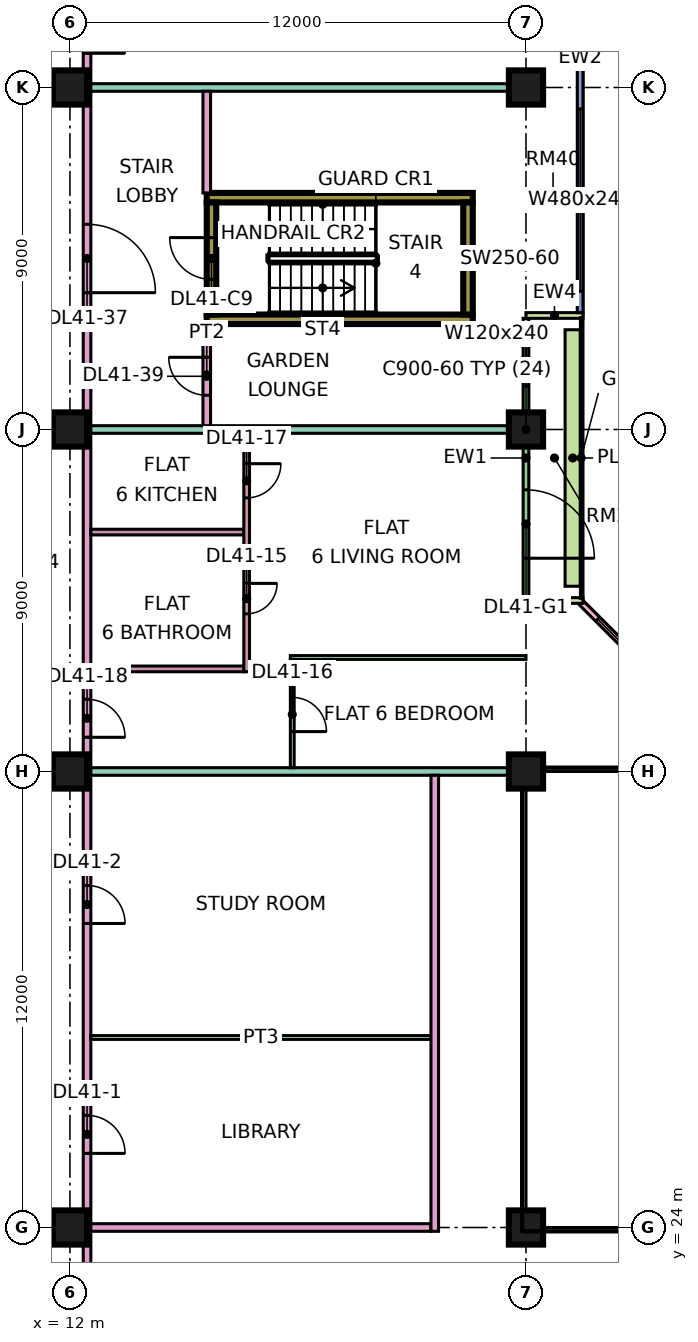
"""IFC4 building model, lengths in metres.
Left out: names, types, materials, properties, quantities, classifications, styles, units other than length and angle.
Written with IfcOpenShell. Run it as: python <this file> out.ifc"""

import sys

from ifc_helpers import new_model, si_unit, direction, frame, frame_2d, origin, origin_2d, place, context, subcontext, project, spatial, rectangle, extrude, element, fill, save


model = new_model("IFC4")
c1 = context("Model", 3, precision=1e-05, world=origin(), true_north=direction((0.0, 1.0)))
c2 = subcontext(c1, "Body", "Model", "MODEL_VIEW")
j1 = project(units=[si_unit("LENGTHUNIT", "METRE"), si_unit("PLANEANGLEUNIT", "RADIAN")], contexts=[c1])
p1 = place(None, origin())
s1 = spatial("IfcSite", under=j1, at=p1, CompositionType="ELEMENT")
p2 = place(p1, origin())
s2 = spatial("IfcBuilding", under=s1, at=p2, CompositionType="ELEMENT")
p3 = place(p2, frame((0.0, 0.0, 179.9)))
s3 = spatial("IfcBuildingStorey", under=s2, at=p3, CompositionType="ELEMENT", Elevation=179.9)
for number, where, z_axis, x_axis in (
    (1, (12.0, 24.0, 0.0), (0.0, 0.0, 1.0), (1.0, 0.0, 0.0)),
    (2, (12.0, 36.0, 0.0), (0.0, 0.0, 1.0), (1.0, 0.0, 0.0)),
    (3, (12.0, 45.0, 0.0), (0.0, 0.0, 1.0), (1.0, 0.0, 0.0)),
    (4, (12.0, 54.0, 0.0), (0.0, 0.0, 1.0), (1.0, 0.0, 0.0)),
    (5, (24.0, 24.0, 0.0), (0.0, 0.0, 1.0), (1.0, 0.0, 0.0)),
    (6, (24.0, 36.0, 0.0), (0.0, 0.0, 1.0), (1.0, 0.0, 0.0)),
    (7, (24.0, 45.0, 0.0), (0.0, 0.0, 1.0), (1.0, 0.0, 0.0)),
    (8, (24.0, 54.0, 0.0), (0.0, 0.0, 1.0), (1.0, 0.0, 0.0)),
):
    element("IfcColumn", number, at=place(p3, frame(where, z_axis=z_axis, x_axis=x_axis)), inside=s3, PredefinedType="COLUMN", context=c2, shape_type="SweptSolid", body=[
        extrude(rectangle(XDim=0.9, YDim=0.9, at=origin_2d()), origin(), (0.0, 0.0, 1.0), 3.75),
    ])
for number, where, z_axis, x_axis in (
    (9, (15.6, 47.9, 0.0), (0.0, 0.0, 1.0), (1.0, 0.0, 0.0)),
    (10, (15.6, 51.1, 0.0), (0.0, 0.0, 1.0), (1.0, 0.0, 0.0)),
):
    element("IfcWall", number, at=place(p3, frame(where, z_axis=z_axis, x_axis=x_axis)), inside=s3, PredefinedType="SHEAR", context=c2, shape_type="SweptSolid", body=[
        extrude(rectangle(XDim=7.0, YDim=0.25, at=frame_2d((3.5, 0.0))), origin(), (0.0, 0.0, 1.0), 3.75),
    ])
p4 = place(p3, frame((15.725, 48.025, 0.0), z_axis=(0.0, 0.0, 1.0), x_axis=(0.0, 1.0, 0.0)))
e11 = element("IfcWall", 11, at=p4, inside=s3, PredefinedType="SHEAR", context=c2, shape_type="SweptSolid", body=[
    extrude(rectangle(XDim=2.95, YDim=0.25, at=frame_2d((1.475, 0.0))), origin(), (0.0, 0.0, 1.0), 3.75),
])
p5 = place(p4, frame((0.925, 0.0, 0.0)))
e12 = element("IfcOpeningElement", 12, at=p5, cuts=e11, PredefinedType="OPENING", context=c2, shape_type="SweptSolid", body=[
    extrude(rectangle(XDim=1.1, YDim=2.2, at=frame_2d((0.55, 1.1))), frame((0.0, 0.135, 0.0), z_axis=(0.0, -1.0, 0.0), x_axis=(1.0, 0.0, 0.0)), (0.0, 0.0, 1.0), 0.27),
])
p6 = place(p3, frame((22.475, 48.025, 0.0), z_axis=(0.0, 0.0, 1.0), x_axis=(0.0, 1.0, 0.0)))
e13 = element("IfcWall", 13, at=p6, inside=s3, PredefinedType="SHEAR", context=c2, shape_type="SweptSolid", body=[
    extrude(rectangle(XDim=2.95, YDim=0.25, at=frame_2d((1.475, 0.0))), origin(), (0.0, 0.0, 1.0), 3.75),
])
p7 = place(p3, frame((28.447, 37.447, 0.0), z_axis=(0.0, 0.0, 1.0), x_axis=(-0.707106781187, 0.707106781187, 0.0)))
e14 = element("IfcWall", 14, at=p7, inside=s3, PredefinedType="SOLIDWALL", context=c2, shape_type="SweptSolid", body=[
    extrude(rectangle(XDim=4.243, YDim=0.15, at=frame_2d((2.121, 0.0))), origin(), (0.0, 0.0, 1.0), 3.35),
])
p8 = place(p7, frame((0.621, 0.0, 0.45)))
e15 = element("IfcOpeningElement", 15, at=p8, cuts=e14, PredefinedType="OPENING", context=c2, shape_type="SweptSolid", body=[
    extrude(rectangle(XDim=3.0, YDim=2.4, at=frame_2d((1.5, 1.2))), frame((0.0, 0.085, 0.0), z_axis=(0.0, -1.0, 0.0), x_axis=(1.0, 0.0, 0.0)), (0.0, 0.0, 1.0), 0.17),
])
p9 = place(p3, frame((24.0, 40.575, 0.0), z_axis=(0.0, 0.0, 1.0), x_axis=(0.0, 1.0, 0.0)))
e16 = element("IfcWall", 16, at=p9, inside=s3, PredefinedType="SOLIDWALL", context=c2, shape_type="SweptSolid", body=[
    extrude(rectangle(XDim=7.35, YDim=0.15, at=frame_2d((3.675, 0.0))), origin(), (0.0, 0.0, 1.0), 3.35),
])
p10 = place(p9, frame((1.038, 0.0, 0.0)))
e17 = element("IfcOpeningElement", 17, at=p10, cuts=e16, PredefinedType="OPENING", context=c2, shape_type="SweptSolid", body=[
    extrude(rectangle(XDim=1.8, YDim=2.4, at=frame_2d((0.9, 1.2))), frame((0.0, 0.085, 0.0), z_axis=(0.0, -1.0, 0.0), x_axis=(1.0, 0.0, 0.0)), (0.0, 0.0, 1.0), 0.17),
])
p11 = place(p9, frame((5.562, 0.0, 0.45)))
e18 = element("IfcOpeningElement", 18, at=p11, cuts=e16, PredefinedType="OPENING", context=c2, shape_type="SweptSolid", body=[
    extrude(rectangle(XDim=1.2, YDim=2.4, at=frame_2d((0.6, 1.2))), frame((0.0, 0.085, 0.0), z_axis=(0.0, -1.0, 0.0), x_axis=(1.0, 0.0, 0.0)), (0.0, 0.0, 1.0), 0.17),
])
for number, where, z_axis, x_axis in (
    (19, (25.5, 40.5, 0.0), (0.0, 0.0, 1.0), (-1.0, 0.0, 0.0)),
    (20, (25.5, 48.0, 0.0), (0.0, 0.0, 1.0), (-1.0, 0.0, 0.0)),
):
    element("IfcWall", number, at=place(p3, frame(where, z_axis=z_axis, x_axis=x_axis)), inside=s3, PredefinedType="SOLIDWALL", context=c2, shape_type="SweptSolid", body=[
        extrude(rectangle(XDim=1.5, YDim=0.15, at=frame_2d((0.75, 0.0))), origin(), (0.0, 0.0, 1.0), 3.35),
    ])
p12 = place(p3, frame((25.425, 48.075, 0.0), z_axis=(0.0, 0.0, 1.0), x_axis=(0.0, 1.0, 0.0)))
e21 = element("IfcWall", 21, at=p12, inside=s3, PredefinedType="SOLIDWALL", context=c2, shape_type="SweptSolid", body=[
    extrude(rectangle(XDim=13.425, YDim=0.15, at=frame_2d((6.712, 0.0))), origin(), (0.0, 0.0, 1.0), 3.35),
])
p13 = place(p12, frame((0.562, 0.0, 0.45)))
e22 = element("IfcOpeningElement", 22, at=p13, cuts=e21, PredefinedType="OPENING", context=c2, shape_type="SweptSolid", body=[
    extrude(rectangle(XDim=4.8, YDim=2.4, at=frame_2d((2.4, 1.2))), frame((0.0, 0.085, 0.0), z_axis=(0.0, -1.0, 0.0), x_axis=(1.0, 0.0, 0.0)), (0.0, 0.0, 1.0), 0.17),
])
p14 = place(p12, frame((7.425, 0.0, 0.45)))
e23 = element("IfcOpeningElement", 23, at=p14, cuts=e21, PredefinedType="OPENING", context=c2, shape_type="SweptSolid", body=[
    extrude(rectangle(XDim=3.0, YDim=2.4, at=frame_2d((1.5, 1.2))), frame((0.0, 0.085, 0.0), z_axis=(0.0, -1.0, 0.0), x_axis=(1.0, 0.0, 0.0)), (0.0, 0.0, 1.0), 0.17),
])
p15 = place(p12, frame((12.225, 0.0, 0.45)))
e24 = element("IfcOpeningElement", 24, at=p15, cuts=e21, PredefinedType="OPENING", context=c2, shape_type="SweptSolid", body=[
    extrude(rectangle(XDim=0.9, YDim=2.4, at=frame_2d((0.45, 1.2))), frame((0.0, 0.085, 0.0), z_axis=(0.0, -1.0, 0.0), x_axis=(1.0, 0.0, 0.0)), (0.0, 0.0, 1.0), 0.17),
])
p16 = place(p3, frame((25.229, 40.875, 0.0), z_axis=(0.0, 0.0, 1.0), x_axis=(0.0, 1.0, 0.0)))
e25 = element("IfcWall", 25, at=p16, inside=s3, PredefinedType="SOLIDWALL", context=c2, shape_type="SweptSolid", body=[
    extrude(rectangle(XDim=6.75, YDim=0.4, at=frame_2d((3.375, 0.0))), origin(), (0.0, 0.0, 1.0), 0.7),
])
p17 = place(p3, frame((12.45, 20.0, 0.0), z_axis=(0.0, 0.0, 1.0), x_axis=(0.0, 1.0, 0.0)))
e26 = element("IfcWall", 26, at=p17, inside=s3, PredefinedType="PARTITIONING", context=c2, shape_type="SweptSolid", body=[
    extrude(rectangle(XDim=42.926, YDim=0.2, at=frame_2d((21.463, 0.0))), origin(), (0.0, 0.0, 1.0), 3.35),
])
p18 = place(p17, frame((5.95, 0.0, 0.0)))
e27 = element("IfcOpeningElement", 27, at=p18, cuts=e26, PredefinedType="OPENING", context=c2, shape_type="SweptSolid", body=[
    extrude(rectangle(XDim=1.0, YDim=2.1, at=frame_2d((0.5, 1.05))), frame((0.0, 0.11, 0.0), z_axis=(0.0, -1.0, 0.0), x_axis=(1.0, 0.0, 0.0)), (0.0, 0.0, 1.0), 0.22),
])
p19 = place(p17, frame((12.0, 0.0, 0.0)))
e28 = element("IfcOpeningElement", 28, at=p19, cuts=e26, PredefinedType="OPENING", context=c2, shape_type="SweptSolid", body=[
    extrude(rectangle(XDim=1.0, YDim=2.1, at=frame_2d((0.5, 1.05))), frame((0.0, 0.11, 0.0), z_axis=(0.0, -1.0, 0.0), x_axis=(1.0, 0.0, 0.0)), (0.0, 0.0, 1.0), 0.22),
])
p20 = place(p17, frame((16.9, 0.0, 0.0)))
e29 = element("IfcOpeningElement", 29, at=p20, cuts=e26, PredefinedType="OPENING", context=c2, shape_type="SweptSolid", body=[
    extrude(rectangle(XDim=1.0, YDim=2.1, at=frame_2d((0.5, 1.05))), frame((0.0, 0.11, 0.0), z_axis=(0.0, -1.0, 0.0), x_axis=(1.0, 0.0, 0.0)), (0.0, 0.0, 1.0), 0.22),
])
p21 = place(p17, frame((34.9, 0.0, 0.0)))
e30 = element("IfcOpeningElement", 30, at=p21, cuts=e26, PredefinedType="OPENING", context=c2, shape_type="SweptSolid", body=[
    extrude(rectangle(XDim=1.0, YDim=2.1, at=frame_2d((0.5, 1.05))), frame((0.0, 0.11, 0.0), z_axis=(0.0, -1.0, 0.0), x_axis=(1.0, 0.0, 0.0)), (0.0, 0.0, 1.0), 0.22),
])
p22 = place(p17, frame((1.15, 0.0, 0.0)))
e31 = element("IfcOpeningElement", 31, at=p22, cuts=e26, PredefinedType="OPENING", context=c2, shape_type="SweptSolid", body=[
    extrude(rectangle(XDim=1.8, YDim=2.1, at=frame_2d((0.9, 1.05))), frame((0.0, 0.11, 0.0), z_axis=(0.0, -1.0, 0.0), x_axis=(1.0, 0.0, 0.0)), (0.0, 0.0, 1.0), 0.22),
])
p23 = place(p17, frame((28.6, 0.0, 0.0)))
e32 = element("IfcOpeningElement", 32, at=p23, cuts=e26, PredefinedType="OPENING", context=c2, shape_type="SweptSolid", body=[
    extrude(rectangle(XDim=1.8, YDim=2.1, at=frame_2d((0.9, 1.05))), frame((0.0, 0.11, 0.0), z_axis=(0.0, -1.0, 0.0), x_axis=(1.0, 0.0, 0.0)), (0.0, 0.0, 1.0), 0.22),
])
p24 = place(p3, frame((12.55, 24.0, 0.0), z_axis=(0.0, 0.0, 1.0), x_axis=(1.0, 0.0, 0.0)))
e33 = element("IfcWall", 33, at=p24, inside=s3, PredefinedType="PARTITIONING", context=c2, shape_type="SweptSolid", body=[
    extrude(rectangle(XDim=8.95, YDim=0.2, at=frame_2d((4.475, 0.0))), origin(), (0.0, 0.0, 1.0), 3.35),
])
p25 = place(p3, frame((12.55, 29.0, 0.0), z_axis=(0.0, 0.0, 1.0), x_axis=(1.0, 0.0, 0.0)))
e34 = element("IfcWall", 34, at=p25, inside=s3, PredefinedType="PARTITIONING", context=c2, shape_type="SweptSolid", body=[
    extrude(rectangle(XDim=8.95, YDim=0.1, at=frame_2d((4.475, 0.0))), origin(), (0.0, 0.0, 1.0), 3.35),
])
p26 = place(p3, frame((12.55, 36.0, 0.0), z_axis=(0.0, 0.0, 1.0), x_axis=(1.0, 0.0, 0.0)))
e35 = element("IfcWall", 35, at=p26, inside=s3, PredefinedType="PARTITIONING", context=c2, shape_type="SweptSolid", body=[
    extrude(rectangle(XDim=11.45, YDim=0.2, at=frame_2d((5.725, 0.0))), origin(), (0.0, 0.0, 1.0), 3.35),
])
for number, where, z_axis, x_axis in (
    (36, (12.55, 38.7, 0.0), (0.0, 0.0, 1.0), (1.0, 0.0, 0.0)),
    (37, (12.55, 42.3, 0.0), (0.0, 0.0, 1.0), (1.0, 0.0, 0.0)),
):
    element("IfcWall", number, at=place(p3, frame(where, z_axis=z_axis, x_axis=x_axis)), inside=s3, PredefinedType="PARTITIONING", context=c2, shape_type="SweptSolid", body=[
        extrude(rectangle(XDim=4.025, YDim=0.15, at=frame_2d((2.012, 0.0))), origin(), (0.0, 0.0, 1.0), 3.35),
    ])
p27 = place(p3, frame((12.55, 45.0, 0.0), z_axis=(0.0, 0.0, 1.0), x_axis=(1.0, 0.0, 0.0)))
e38 = element("IfcWall", 38, at=p27, inside=s3, PredefinedType="PARTITIONING", context=c2, shape_type="SweptSolid", body=[
    extrude(rectangle(XDim=11.376, YDim=0.2, at=frame_2d((5.688, 0.0))), origin(), (0.0, 0.0, 1.0), 3.35),
])
p28 = place(p3, frame((12.55, 54.0, 0.0), z_axis=(0.0, 0.0, 1.0), x_axis=(1.0, 0.0, 0.0)))
e39 = element("IfcWall", 39, at=p28, inside=s3, PredefinedType="PARTITIONING", context=c2, shape_type="SweptSolid", body=[
    extrude(rectangle(XDim=11.45, YDim=0.2, at=frame_2d((5.725, 0.0))), origin(), (0.0, 0.0, 1.0), 3.35),
])
p29 = place(p3, frame((15.6, 45.1, 0.0), z_axis=(0.0, 0.0, 1.0), x_axis=(0.0, 1.0, 0.0)))
e40 = element("IfcWall", 40, at=p29, inside=s3, PredefinedType="PARTITIONING", context=c2, shape_type="SweptSolid", body=[
    extrude(rectangle(XDim=2.675, YDim=0.2, at=frame_2d((1.337, 0.0))), origin(), (0.0, 0.0, 1.0), 3.35),
])
p30 = place(p29, frame((0.8, 0.0, 0.0)))
e41 = element("IfcOpeningElement", 41, at=p30, cuts=e40, PredefinedType="OPENING", context=c2, shape_type="SweptSolid", body=[
    extrude(rectangle(XDim=1.0, YDim=2.1, at=frame_2d((0.5, 1.05))), frame((0.0, 0.11, 0.0), z_axis=(0.0, -1.0, 0.0), x_axis=(1.0, 0.0, 0.0)), (0.0, 0.0, 1.0), 0.22),
])
p31 = place(p3, frame((15.6, 51.225, 0.0), z_axis=(0.0, 0.0, 1.0), x_axis=(0.0, 1.0, 0.0)))
e42 = element("IfcWall", 42, at=p31, inside=s3, PredefinedType="PARTITIONING", context=c2, shape_type="SweptSolid", body=[
    extrude(rectangle(XDim=2.675, YDim=0.2, at=frame_2d((1.337, 0.0))), origin(), (0.0, 0.0, 1.0), 3.35),
])
p32 = place(p3, frame((16.65, 38.625, 0.0), z_axis=(0.0, 0.0, 1.0), x_axis=(0.0, 1.0, 0.0)))
e43 = element("IfcWall", 43, at=p32, inside=s3, PredefinedType="PARTITIONING", context=c2, shape_type="SweptSolid", body=[
    extrude(rectangle(XDim=6.275, YDim=0.15, at=frame_2d((3.137, 0.0))), origin(), (0.0, 0.0, 1.0), 3.35),
])
p33 = place(p32, frame((1.525, 0.0, 0.0)))
e44 = element("IfcOpeningElement", 44, at=p33, cuts=e43, PredefinedType="OPENING", context=c2, shape_type="SweptSolid", body=[
    extrude(rectangle(XDim=0.8, YDim=2.1, at=frame_2d((0.4, 1.05))), frame((0.0, 0.085, 0.0), z_axis=(0.0, -1.0, 0.0), x_axis=(1.0, 0.0, 0.0)), (0.0, 0.0, 1.0), 0.17),
])
p34 = place(p32, frame((4.575, 0.0, 0.0)))
e45 = element("IfcOpeningElement", 45, at=p34, cuts=e43, PredefinedType="OPENING", context=c2, shape_type="SweptSolid", body=[
    extrude(rectangle(XDim=0.9, YDim=2.1, at=frame_2d((0.45, 1.05))), frame((0.0, 0.085, 0.0), z_axis=(0.0, -1.0, 0.0), x_axis=(1.0, 0.0, 0.0)), (0.0, 0.0, 1.0), 0.17),
])
p35 = place(p3, frame((17.8, 39.0, 0.0), z_axis=(0.0, 0.0, 1.0), x_axis=(1.0, 0.0, 0.0)))
e46 = element("IfcWall", 46, at=p35, inside=s3, PredefinedType="PARTITIONING", context=c2, shape_type="SweptSolid", body=[
    extrude(rectangle(XDim=6.2, YDim=0.1, at=frame_2d((3.1, 0.0))), origin(), (0.0, 0.0, 1.0), 3.35),
])
p36 = place(p3, frame((17.85, 36.1, 0.0), z_axis=(0.0, 0.0, 1.0), x_axis=(0.0, 1.0, 0.0)))
e47 = element("IfcWall", 47, at=p36, inside=s3, PredefinedType="PARTITIONING", context=c2, shape_type="SweptSolid", body=[
    extrude(rectangle(XDim=2.85, YDim=0.1, at=frame_2d((1.425, 0.0))), origin(), (0.0, 0.0, 1.0), 3.35),
])
p37 = place(p36, frame((0.95, 0.0, 0.0)))
e48 = element("IfcOpeningElement", 48, at=p37, cuts=e47, PredefinedType="OPENING", context=c2, shape_type="SweptSolid", body=[
    extrude(rectangle(XDim=0.9, YDim=2.1, at=frame_2d((0.45, 1.05))), frame((0.0, 0.06, 0.0), z_axis=(0.0, -1.0, 0.0), x_axis=(1.0, 0.0, 0.0)), (0.0, 0.0, 1.0), 0.12),
])
p38 = place(p3, frame((21.6, 23.9, 0.0), z_axis=(0.0, 0.0, 1.0), x_axis=(0.0, 1.0, 0.0)))
e49 = element("IfcWall", 49, at=p38, inside=s3, PredefinedType="PARTITIONING", context=c2, shape_type="SweptSolid", body=[
    extrude(rectangle(XDim=12.0, YDim=0.2, at=frame_2d((6.0, 0.0))), origin(), (0.0, 0.0, 1.0), 3.35),
])
p39 = place(p8, origin())
e50 = element("IfcWindow", 50, at=p39, inside=s3, PartitioningType="SINGLE_PANEL", PredefinedType="WINDOW", context=c2, shape_type="SweptSolid", body=[
    extrude(rectangle(XDim=3.0, YDim=2.4, at=frame_2d((1.5, 1.2))), frame((0.0, 0.03, 0.0), z_axis=(0.0, -1.0, 0.0), x_axis=(1.0, 0.0, 0.0)), (0.0, 0.0, 1.0), 0.06),
])
fill(e15, e50)
p40 = place(p10, frame((1.8, 0.0, 0.0), z_axis=(0.0, 0.0, 1.0), x_axis=(-1.0, 0.0, 0.0)))
e51 = element("IfcDoor", 51, at=p40, inside=s3, OperationType="DOUBLE_DOOR_SINGLE_SWING", PredefinedType="DOOR", context=c2, shape_type="SweptSolid", body=[
    extrude(rectangle(XDim=1.8, YDim=2.4, at=frame_2d((0.9, 1.2))), frame((0.0, 0.025, 0.0), z_axis=(0.0, -1.0, 0.0), x_axis=(1.0, 0.0, 0.0)), (0.0, 0.0, 1.0), 0.05),
])
fill(e17, e51)
p41 = place(p11, origin())
e52 = element("IfcWindow", 52, at=p41, inside=s3, PartitioningType="SINGLE_PANEL", PredefinedType="WINDOW", context=c2, shape_type="SweptSolid", body=[
    extrude(rectangle(XDim=1.2, YDim=2.4, at=frame_2d((0.6, 1.2))), frame((0.0, 0.03, 0.0), z_axis=(0.0, -1.0, 0.0), x_axis=(1.0, 0.0, 0.0)), (0.0, 0.0, 1.0), 0.06),
])
fill(e18, e52)
p42 = place(p13, origin())
e53 = element("IfcWindow", 53, at=p42, inside=s3, PartitioningType="SINGLE_PANEL", PredefinedType="WINDOW", context=c2, shape_type="SweptSolid", body=[
    extrude(rectangle(XDim=4.8, YDim=2.4, at=frame_2d((2.4, 1.2))), frame((0.0, 0.03, 0.0), z_axis=(0.0, -1.0, 0.0), x_axis=(1.0, 0.0, 0.0)), (0.0, 0.0, 1.0), 0.06),
])
fill(e22, e53)
p43 = place(p5, frame((1.1, 0.0, 0.0), z_axis=(0.0, 0.0, 1.0), x_axis=(-1.0, 0.0, 0.0)))
e54 = element("IfcDoor", 54, at=p43, inside=s3, OperationType="SINGLE_SWING_RIGHT", PredefinedType="DOOR", context=c2, shape_type="SweptSolid", body=[
    extrude(rectangle(XDim=1.1, YDim=2.2, at=frame_2d((0.55, 1.1))), frame((0.0, 0.025, 0.0), z_axis=(0.0, -1.0, 0.0), x_axis=(1.0, 0.0, 0.0)), (0.0, 0.0, 1.0), 0.05),
])
fill(e12, e54)
p44 = place(p18, frame((1.0, 0.0, 0.0), z_axis=(0.0, 0.0, 1.0), x_axis=(-1.0, 0.0, 0.0)))
e55 = element("IfcDoor", 55, at=p44, inside=s3, OperationType="SINGLE_SWING_LEFT", PredefinedType="DOOR", context=c2, shape_type="SweptSolid", body=[
    extrude(rectangle(XDim=1.0, YDim=2.1, at=frame_2d((0.5, 1.05))), frame((0.0, 0.025, 0.0), z_axis=(0.0, -1.0, 0.0), x_axis=(1.0, 0.0, 0.0)), (0.0, 0.0, 1.0), 0.05),
])
fill(e27, e55)
p45 = place(p19, frame((1.0, 0.0, 0.0), z_axis=(0.0, 0.0, 1.0), x_axis=(-1.0, 0.0, 0.0)))
e56 = element("IfcDoor", 56, at=p45, inside=s3, OperationType="SINGLE_SWING_LEFT", PredefinedType="DOOR", context=c2, shape_type="SweptSolid", body=[
    extrude(rectangle(XDim=1.0, YDim=2.1, at=frame_2d((0.5, 1.05))), frame((0.0, 0.025, 0.0), z_axis=(0.0, -1.0, 0.0), x_axis=(1.0, 0.0, 0.0)), (0.0, 0.0, 1.0), 0.05),
])
fill(e28, e56)
p46 = place(p33, origin())
e57 = element("IfcDoor", 57, at=p46, inside=s3, OperationType="SINGLE_SWING_RIGHT", PredefinedType="DOOR", context=c2, shape_type="SweptSolid", body=[
    extrude(rectangle(XDim=0.8, YDim=2.1, at=frame_2d((0.4, 1.05))), frame((0.0, 0.025, 0.0), z_axis=(0.0, -1.0, 0.0), x_axis=(1.0, 0.0, 0.0)), (0.0, 0.0, 1.0), 0.05),
])
fill(e44, e57)
p47 = place(p37, frame((0.9, 0.0, 0.0), z_axis=(0.0, 0.0, 1.0), x_axis=(-1.0, 0.0, 0.0)))
e58 = element("IfcDoor", 58, at=p47, inside=s3, OperationType="SINGLE_SWING_LEFT", PredefinedType="DOOR", context=c2, shape_type="SweptSolid", body=[
    extrude(rectangle(XDim=0.9, YDim=2.1, at=frame_2d((0.45, 1.05))), frame((0.0, 0.025, 0.0), z_axis=(0.0, -1.0, 0.0), x_axis=(1.0, 0.0, 0.0)), (0.0, 0.0, 1.0), 0.05),
])
fill(e48, e58)
p48 = place(p34, origin())
e59 = element("IfcDoor", 59, at=p48, inside=s3, OperationType="SINGLE_SWING_RIGHT", PredefinedType="DOOR", context=c2, shape_type="SweptSolid", body=[
    extrude(rectangle(XDim=0.9, YDim=2.1, at=frame_2d((0.45, 1.05))), frame((0.0, 0.025, 0.0), z_axis=(0.0, -1.0, 0.0), x_axis=(1.0, 0.0, 0.0)), (0.0, 0.0, 1.0), 0.05),
])
fill(e45, e59)
p49 = place(p20, frame((1.0, 0.0, 0.0), z_axis=(0.0, 0.0, 1.0), x_axis=(-1.0, 0.0, 0.0)))
e60 = element("IfcDoor", 60, at=p49, inside=s3, OperationType="SINGLE_SWING_LEFT", PredefinedType="DOOR", context=c2, shape_type="SweptSolid", body=[
    extrude(rectangle(XDim=1.0, YDim=2.1, at=frame_2d((0.5, 1.05))), frame((0.0, 0.025, 0.0), z_axis=(0.0, -1.0, 0.0), x_axis=(1.0, 0.0, 0.0)), (0.0, 0.0, 1.0), 0.05),
])
fill(e29, e60)
p50 = place(p21, frame((1.0, 0.0, 0.0), z_axis=(0.0, 0.0, 1.0), x_axis=(-1.0, 0.0, 0.0)))
e61 = element("IfcDoor", 61, at=p50, inside=s3, OperationType="SINGLE_SWING_LEFT", PredefinedType="DOOR", context=c2, shape_type="SweptSolid", body=[
    extrude(rectangle(XDim=1.0, YDim=2.1, at=frame_2d((0.5, 1.05))), frame((0.0, 0.025, 0.0), z_axis=(0.0, -1.0, 0.0), x_axis=(1.0, 0.0, 0.0)), (0.0, 0.0, 1.0), 0.05),
])
fill(e30, e61)
p51 = place(p23, frame((1.8, 0.0, 0.0), z_axis=(0.0, 0.0, 1.0), x_axis=(-1.0, 0.0, 0.0)))
e62 = element("IfcDoor", 62, at=p51, inside=s3, OperationType="DOUBLE_DOOR_SINGLE_SWING", PredefinedType="DOOR", context=c2, shape_type="SweptSolid", body=[
    extrude(rectangle(XDim=1.8, YDim=2.1, at=frame_2d((0.9, 1.05))), frame((0.0, 0.025, 0.0), z_axis=(0.0, -1.0, 0.0), x_axis=(1.0, 0.0, 0.0)), (0.0, 0.0, 1.0), 0.05),
])
fill(e32, e62)
p52 = place(p30, frame((1.0, 0.0, 0.0), z_axis=(0.0, 0.0, 1.0), x_axis=(-1.0, 0.0, 0.0)))
e63 = element("IfcDoor", 63, at=p52, inside=s3, OperationType="SINGLE_SWING_RIGHT", PredefinedType="DOOR", context=c2, shape_type="SweptSolid", body=[
    extrude(rectangle(XDim=1.0, YDim=2.1, at=frame_2d((0.5, 1.05))), frame((0.0, 0.025, 0.0), z_axis=(0.0, -1.0, 0.0), x_axis=(1.0, 0.0, 0.0)), (0.0, 0.0, 1.0), 0.05),
])
fill(e41, e63)
save(model, sys.argv[1])
